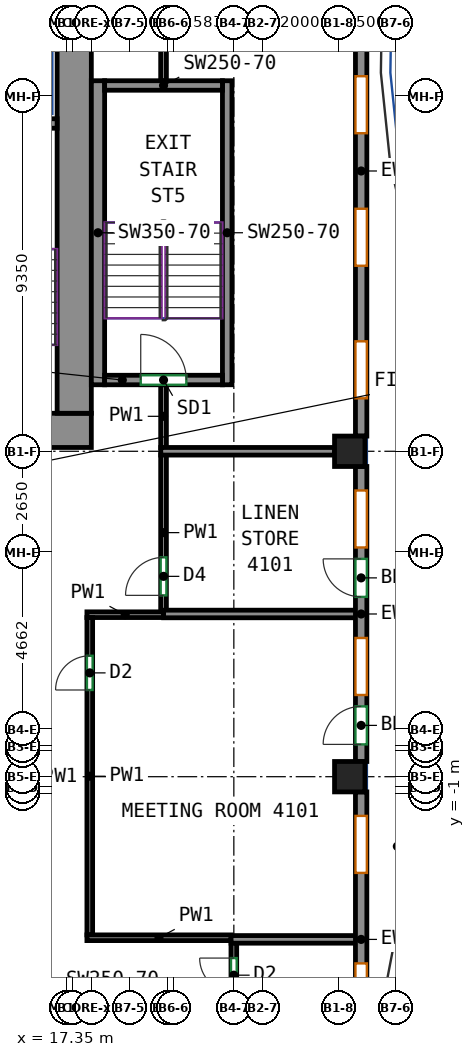
"""IFC4 building model, lengths in metres.
Left out: names, types, materials, properties, quantities, classifications, styles, units other than length and angle.
Written with IfcOpenShell. Run it as: python <this file> out.ifc"""

import sys

from ifc_helpers import new_model, si_unit, direction, frame, frame_2d, origin, origin_2d, place, context, subcontext, project, spatial, rectangle, extrude, source, transform, mapped, element, fill, save


model = new_model("IFC4")
c1 = context("Model", 3, precision=1e-05, world=origin(), true_north=direction((0.0, 1.0)))
c2 = subcontext(c1, "Body", "Model", "MODEL_VIEW")
j1 = project(units=[si_unit("LENGTHUNIT", "METRE"), si_unit("PLANEANGLEUNIT", "RADIAN")], contexts=[c1])
p1 = place(None, origin())
s1 = spatial("IfcSite", under=j1, at=p1, CompositionType="ELEMENT")
p2 = place(p1, origin())
s2 = spatial("IfcBuilding", under=s1, at=p2, CompositionType="ELEMENT")
p3 = place(p2, frame((0.0, 0.0, 175.3)))
s3 = spatial("IfcBuildingStorey", under=s2, at=p3, CompositionType="ELEMENT", Elevation=175.3)
m1 = source(origin(), c2, "Body", "SweptSolid", [
    extrude(rectangle(XDim=0.8, YDim=0.8, at=origin_2d()), origin(), (0.0, 0.0, 1.0), 3.12),
])
for number, where, z_axis, x_axis in (
    (1, (24.8, -0.562, 0.0), (0.0, 0.0, 1.0), (1.0, 0.0, 0.0)),
    (2, (24.8, 8.0, 0.0), (0.0, 0.0, 1.0), (1.0, 0.0, 0.0)),
):
    element("IfcColumn", number, at=place(p3, frame(where, z_axis=z_axis, x_axis=x_axis)), inside=s3, PredefinedType="COLUMN", context=c2, shape_type="MappedRepresentation", body=[
        mapped(m1, transform((0.0, 0.0, 0.0))),
    ])
m2 = source(origin(), c2, "Body", "SweptSolid", [
    extrude(rectangle(XDim=5.53, YDim=0.9, at=frame_2d((2.765, 0.0))), origin(), (0.0, 0.0, 1.0), 3.12),
])
p4 = place(p3, frame((12.47, 8.55, 0.0), z_axis=(0.0, 0.0, 1.0), x_axis=(1.0, 0.0, 0.0)))
e3 = element("IfcWall", 3, at=p4, inside=s3, PredefinedType="SHEAR", context=c2, shape_type="MappedRepresentation", body=[
    mapped(m2, transform((0.0, 0.0, 0.0))),
])
p5 = place(p4, frame((2.18, 0.0, 0.0)))
e4 = element("IfcOpeningElement", 4, at=p5, cuts=e3, PredefinedType="OPENING", context=c2, shape_type="SweptSolid", body=[
    extrude(rectangle(XDim=1.2, YDim=2.1, at=frame_2d((0.6, 1.05))), frame((0.0, 0.46, 0.0), z_axis=(0.0, -1.0, 0.0), x_axis=(1.0, 0.0, 0.0)), (0.0, 0.0, 1.0), 0.92),
])
m3 = source(origin(), c2, "Body", "SweptSolid", [
    extrude(rectangle(XDim=12.0, YDim=0.9, at=frame_2d((6.0, 0.0))), origin(), (0.0, 0.0, 1.0), 3.12),
])
p6 = place(p3, frame((17.55, 9.0, 0.0), z_axis=(0.0, 0.0, 1.0), x_axis=(0.0, 1.0, 0.0)))
e5 = element("IfcWall", 5, at=p6, inside=s3, PredefinedType="SHEAR", context=c2, shape_type="MappedRepresentation", body=[
    mapped(m3, transform((0.0, 0.0, 0.0))),
])
m4 = source(origin(), c2, "Body", "SweptSolid", [
    extrude(rectangle(XDim=3.7, YDim=0.25, at=frame_2d((1.85, 0.0))), origin(), (0.0, 0.0, 1.0), 3.12),
])
p7 = place(p3, frame((13.4, 16.625, 0.0), z_axis=(0.0, 0.0, 1.0), x_axis=(1.0, 0.0, 0.0)))
e6 = element("IfcWall", 6, at=p7, inside=s3, PredefinedType="SHEAR", context=c2, shape_type="MappedRepresentation", body=[
    mapped(m4, transform((0.0, 0.0, 0.0))),
])
m5 = source(origin(), c2, "Body", "SweptSolid", [
    extrude(rectangle(XDim=8.0, YDim=0.35, at=frame_2d((4.0, 0.0))), origin(), (0.0, 0.0, 1.0), 3.12),
])
p8 = place(p3, frame((18.175, 9.75, 0.0), z_axis=(0.0, 0.0, 1.0), x_axis=(0.0, 1.0, 0.0)))
e7 = element("IfcWall", 7, at=p8, inside=s3, PredefinedType="SHEAR", context=c2, shape_type="MappedRepresentation", body=[
    mapped(m5, transform((0.0, 0.0, 0.0))),
])
m6 = source(origin(), c2, "Body", "SweptSolid", [
    extrude(rectangle(XDim=8.0, YDim=0.25, at=frame_2d((4.0, 0.0))), origin(), (0.0, 0.0, 1.0), 3.12),
])
p9 = place(p3, frame((21.575, 9.75, 0.0), z_axis=(0.0, 0.0, 1.0), x_axis=(0.0, 1.0, 0.0)))
e8 = element("IfcWall", 8, at=p9, inside=s3, PredefinedType="SHEAR", context=c2, shape_type="MappedRepresentation", body=[
    mapped(m6, transform((0.0, 0.0, 0.0))),
])
m7 = source(origin(), c2, "Body", "SweptSolid", [
    extrude(rectangle(XDim=3.1, YDim=0.25, at=frame_2d((1.55, 0.0))), origin(), (0.0, 0.0, 1.0), 3.12),
])
p10 = place(p3, frame((18.35, 9.875, 0.0), z_axis=(0.0, 0.0, 1.0), x_axis=(1.0, 0.0, 0.0)))
e9 = element("IfcWall", 9, at=p10, inside=s3, PredefinedType="SHEAR", context=c2, shape_type="MappedRepresentation", body=[
    mapped(m7, transform((0.0, 0.0, 0.0))),
])
p11 = place(p10, frame((0.95, 0.0, 0.0)))
e10 = element("IfcOpeningElement", 10, at=p11, cuts=e9, PredefinedType="OPENING", context=c2, shape_type="SweptSolid", body=[
    extrude(rectangle(XDim=1.2, YDim=2.1, at=frame_2d((0.6, 1.05))), frame((0.0, 0.135, 0.0), z_axis=(0.0, -1.0, 0.0), x_axis=(1.0, 0.0, 0.0)), (0.0, 0.0, 1.0), 0.27),
])
p12 = place(p3, frame((18.35, 17.625, 0.0), z_axis=(0.0, 0.0, 1.0), x_axis=(1.0, 0.0, 0.0)))
e11 = element("IfcWall", 11, at=p12, inside=s3, PredefinedType="SHEAR", context=c2, shape_type="MappedRepresentation", body=[
    mapped(m7, transform((0.0, 0.0, 0.0))),
])
m8 = source(origin(), c2, "Body", "SweptSolid", [
    extrude(rectangle(XDim=7.763, YDim=0.3, at=frame_2d((3.881, 0.0))), origin(), (0.0, 0.0, 1.0), 3.12),
])
p13 = place(p3, frame((25.1, -8.725, 0.0), z_axis=(0.0, 0.0, 1.0), x_axis=(0.0, 1.0, 0.0)))
e12 = element("IfcWall", 12, at=p13, inside=s3, PredefinedType="SOLIDWALL", context=c2, shape_type="MappedRepresentation", body=[
    mapped(m8, transform((0.0, 0.0, 0.0))),
])
p14 = place(p13, frame((1.75, 0.0, 0.85)))
e13 = element("IfcOpeningElement", 13, at=p14, cuts=e12, PredefinedType="OPENING", context=c2, shape_type="SweptSolid", body=[
    extrude(rectangle(XDim=1.5, YDim=1.95, at=frame_2d((0.75, 0.975))), frame((0.0, 0.16, 0.0), z_axis=(0.0, -1.0, 0.0), x_axis=(1.0, 0.0, 0.0)), (0.0, 0.0, 1.0), 0.32),
])
p15 = place(p13, frame((5.631, 0.0, 0.85)))
e14 = element("IfcOpeningElement", 14, at=p15, cuts=e12, PredefinedType="OPENING", context=c2, shape_type="SweptSolid", body=[
    extrude(rectangle(XDim=1.5, YDim=1.95, at=frame_2d((0.75, 0.975))), frame((0.0, 0.16, 0.0), z_axis=(0.0, -1.0, 0.0), x_axis=(1.0, 0.0, 0.0)), (0.0, 0.0, 1.0), 0.32),
])
p16 = place(p3, frame((25.1, -0.163, 0.0), z_axis=(0.0, 0.0, 1.0), x_axis=(0.0, 1.0, 0.0)))
e15 = element("IfcWall", 15, at=p16, inside=s3, PredefinedType="SOLIDWALL", context=c2, shape_type="MappedRepresentation", body=[
    mapped(m8, transform((0.0, 0.0, 0.0))),
])
p17 = place(p16, frame((1.75, 0.0, 0.85)))
e16 = element("IfcOpeningElement", 16, at=p17, cuts=e15, PredefinedType="OPENING", context=c2, shape_type="SweptSolid", body=[
    extrude(rectangle(XDim=1.5, YDim=1.95, at=frame_2d((0.75, 0.975))), frame((0.0, 0.16, 0.0), z_axis=(0.0, -1.0, 0.0), x_axis=(1.0, 0.0, 0.0)), (0.0, 0.0, 1.0), 0.32),
])
p18 = place(p16, frame((0.45, 0.0, 0.0)))
e17 = element("IfcOpeningElement", 17, at=p18, cuts=e15, PredefinedType="OPENING", context=c2, shape_type="SweptSolid", body=[
    extrude(rectangle(XDim=1.0, YDim=2.1, at=frame_2d((0.5, 1.05))), frame((0.0, 0.16, 0.0), z_axis=(0.0, -1.0, 0.0), x_axis=(1.0, 0.0, 0.0)), (0.0, 0.0, 1.0), 0.32),
])
p19 = place(p16, frame((5.631, 0.0, 0.85)))
e18 = element("IfcOpeningElement", 18, at=p19, cuts=e15, PredefinedType="OPENING", context=c2, shape_type="SweptSolid", body=[
    extrude(rectangle(XDim=1.5, YDim=1.95, at=frame_2d((0.75, 0.975))), frame((0.0, 0.16, 0.0), z_axis=(0.0, -1.0, 0.0), x_axis=(1.0, 0.0, 0.0)), (0.0, 0.0, 1.0), 0.32),
])
p20 = place(p16, frame((4.331, 0.0, 0.0)))
e19 = element("IfcOpeningElement", 19, at=p20, cuts=e15, PredefinedType="OPENING", context=c2, shape_type="SweptSolid", body=[
    extrude(rectangle(XDim=1.0, YDim=2.1, at=frame_2d((0.5, 1.05))), frame((0.0, 0.16, 0.0), z_axis=(0.0, -1.0, 0.0), x_axis=(1.0, 0.0, 0.0)), (0.0, 0.0, 1.0), 0.32),
])
m9 = source(origin(), c2, "Body", "SweptSolid", [
    extrude(rectangle(XDim=13.95, YDim=0.3, at=frame_2d((6.975, 0.0))), origin(), (0.0, 0.0, 1.0), 3.12),
])
p21 = place(p3, frame((25.1, 8.4, 0.0), z_axis=(0.0, 0.0, 1.0), x_axis=(0.0, 1.0, 0.0)))
e20 = element("IfcWall", 20, at=p21, inside=s3, PredefinedType="SOLIDWALL", context=c2, shape_type="MappedRepresentation", body=[
    mapped(m9, transform((0.0, 0.0, 0.0))),
])
p22 = place(p21, frame((0.994, 0.0, 0.85)))
e21 = element("IfcOpeningElement", 21, at=p22, cuts=e20, PredefinedType="OPENING", context=c2, shape_type="SweptSolid", body=[
    extrude(rectangle(XDim=1.5, YDim=1.95, at=frame_2d((0.75, 0.975))), frame((0.0, 0.16, 0.0), z_axis=(0.0, -1.0, 0.0), x_axis=(1.0, 0.0, 0.0)), (0.0, 0.0, 1.0), 0.32),
])
p23 = place(p21, frame((4.481, 0.0, 0.85)))
e22 = element("IfcOpeningElement", 22, at=p23, cuts=e20, PredefinedType="OPENING", context=c2, shape_type="SweptSolid", body=[
    extrude(rectangle(XDim=1.5, YDim=1.95, at=frame_2d((0.75, 0.975))), frame((0.0, 0.16, 0.0), z_axis=(0.0, -1.0, 0.0), x_axis=(1.0, 0.0, 0.0)), (0.0, 0.0, 1.0), 0.32),
])
p24 = place(p21, frame((7.969, 0.0, 0.85)))
e23 = element("IfcOpeningElement", 23, at=p24, cuts=e20, PredefinedType="OPENING", context=c2, shape_type="SweptSolid", body=[
    extrude(rectangle(XDim=1.5, YDim=1.95, at=frame_2d((0.75, 0.975))), frame((0.0, 0.16, 0.0), z_axis=(0.0, -1.0, 0.0), x_axis=(1.0, 0.0, 0.0)), (0.0, 0.0, 1.0), 0.32),
])
p25 = place(p21, frame((11.456, 0.0, 0.85)))
e24 = element("IfcOpeningElement", 24, at=p25, cuts=e20, PredefinedType="OPENING", context=c2, shape_type="SweptSolid", body=[
    extrude(rectangle(XDim=1.5, YDim=1.95, at=frame_2d((0.75, 0.975))), frame((0.0, 0.16, 0.0), z_axis=(0.0, -1.0, 0.0), x_axis=(1.0, 0.0, 0.0)), (0.0, 0.0, 1.0), 0.32),
])
p26 = place(p3, frame((19.9, 3.809, 0.0), z_axis=(0.0, 0.0, 1.0), x_axis=(0.0, 1.0, 0.0)))
e25 = element("IfcWall", 25, at=p26, inside=s3, PredefinedType="PARTITIONING", context=c2, shape_type="SweptSolid", body=[
    extrude(rectangle(XDim=4.101, YDim=0.15, at=frame_2d((2.05, 0.0))), origin(), (0.0, 0.0, 1.0), 3.12),
])
p27 = place(p26, frame((0.4, 0.0, 0.0)))
e26 = element("IfcOpeningElement", 26, at=p27, cuts=e25, PredefinedType="OPENING", context=c2, shape_type="SweptSolid", body=[
    extrude(rectangle(XDim=1.0, YDim=2.1, at=frame_2d((0.5, 1.05))), frame((0.0, 0.085, 0.0), z_axis=(0.0, -1.0, 0.0), x_axis=(1.0, 0.0, 0.0)), (0.0, 0.0, 1.0), 0.17),
])
p28 = place(p3, frame((19.9, 17.75, 0.0), z_axis=(0.0, 0.0, 1.0), x_axis=(0.0, 1.0, 0.0)))
e27 = element("IfcWall", 27, at=p28, inside=s3, PredefinedType="PARTITIONING", context=c2, shape_type="SweptSolid", body=[
    extrude(rectangle(XDim=4.175, YDim=0.15, at=frame_2d((2.087, 0.0))), origin(), (0.0, 0.0, 1.0), 3.12),
])
p29 = place(p28, frame((1.432, 0.0, 0.0)))
e28 = element("IfcOpeningElement", 28, at=p29, cuts=e27, PredefinedType="OPENING", context=c2, shape_type="SweptSolid", body=[
    extrude(rectangle(XDim=0.9, YDim=2.1, at=frame_2d((0.45, 1.05))), frame((0.0, 0.085, 0.0), z_axis=(0.0, -1.0, 0.0), x_axis=(1.0, 0.0, 0.0)), (0.0, 0.0, 1.0), 0.17),
])
p30 = place(p3, frame((19.9, 8.09, 0.0), z_axis=(0.0, 0.0, 1.0), x_axis=(0.0, 1.0, 0.0)))
e29 = element("IfcWall", 29, at=p30, inside=s3, PredefinedType="PARTITIONING", context=c2, shape_type="SweptSolid", body=[
    extrude(rectangle(XDim=1.66, YDim=0.15, at=frame_2d((0.83, 0.0))), origin(), (0.0, 0.0, 1.0), 3.12),
])
p31 = place(p3, frame((17.884, 3.7, 0.0), z_axis=(0.0, 0.0, 1.0), x_axis=(1.0, 0.0, 0.0)))
e30 = element("IfcWall", 30, at=p31, inside=s3, PredefinedType="PARTITIONING", context=c2, shape_type="SweptSolid", body=[
    extrude(rectangle(XDim=2.016, YDim=0.15, at=frame_2d((1.008, 0.0))), origin(), (0.0, 0.0, 1.0), 3.12),
])
p32 = place(p3, frame((17.959, -4.725, 0.0), z_axis=(0.0, 0.0, 1.0), x_axis=(0.0, 1.0, 0.0)))
e31 = element("IfcWall", 31, at=p32, inside=s3, PredefinedType="PARTITIONING", context=c2, shape_type="SweptSolid", body=[
    extrude(rectangle(XDim=8.35, YDim=0.15, at=frame_2d((4.175, 0.0))), origin(), (0.0, 0.0, 1.0), 3.12),
])
p33 = place(p32, frame((6.444, 0.0, 0.0)))
e32 = element("IfcOpeningElement", 32, at=p33, cuts=e31, PredefinedType="OPENING", context=c2, shape_type="SweptSolid", body=[
    extrude(rectangle(XDim=0.9, YDim=2.1, at=frame_2d((0.45, 1.05))), frame((0.0, 0.085, 0.0), z_axis=(0.0, -1.0, 0.0), x_axis=(1.0, 0.0, 0.0)), (0.0, 0.0, 1.0), 0.17),
])
p34 = place(p3, frame((17.884, -4.8, 0.0), z_axis=(0.0, 0.0, 1.0), x_axis=(1.0, 0.0, 0.0)))
e33 = element("IfcWall", 33, at=p34, inside=s3, PredefinedType="PARTITIONING", context=c2, shape_type="SweptSolid", body=[
    extrude(rectangle(XDim=3.793, YDim=0.15, at=frame_2d((1.896, 0.0))), origin(), (0.0, 0.0, 1.0), 3.12),
])
p35 = place(p3, frame((21.75, -7.75, 0.0), z_axis=(0.0, 0.0, 1.0), x_axis=(0.0, 1.0, 0.0)))
e34 = element("IfcWall", 34, at=p35, inside=s3, PredefinedType="PARTITIONING", context=c2, shape_type="SweptSolid", body=[
    extrude(rectangle(XDim=2.817, YDim=0.15, at=frame_2d((1.408, 0.0))), origin(), (0.0, 0.0, 1.0), 3.12),
])
p36 = place(p35, frame((1.515, 0.0, 0.0)))
e35 = element("IfcOpeningElement", 35, at=p36, cuts=e34, PredefinedType="OPENING", context=c2, shape_type="SweptSolid", body=[
    extrude(rectangle(XDim=0.9, YDim=2.1, at=frame_2d((0.45, 1.05))), frame((0.0, 0.085, 0.0), z_axis=(0.0, -1.0, 0.0), x_axis=(1.0, 0.0, 0.0)), (0.0, 0.0, 1.0), 0.17),
])
p37 = place(p3, frame((19.827, 8.0, 0.0), z_axis=(0.0, 0.0, 1.0), x_axis=(1.0, 0.0, 0.0)))
e36 = element("IfcWall", 36, at=p37, inside=s3, PredefinedType="PARTITIONING", context=c2, shape_type="SweptSolid", body=[
    extrude(rectangle(XDim=4.573, YDim=0.2, at=frame_2d((2.287, 0.0))), origin(), (0.0, 0.0, 1.0), 3.12),
])
p38 = place(p3, frame((19.902, 3.719, 0.0), z_axis=(0.0, 0.0, 1.0), x_axis=(1.0, 0.0, 0.0)))
e37 = element("IfcWall", 37, at=p38, inside=s3, PredefinedType="PARTITIONING", context=c2, shape_type="SweptSolid", body=[
    extrude(rectangle(XDim=5.098, YDim=0.2, at=frame_2d((2.549, 0.0))), origin(), (0.0, 0.0, 1.0), 3.12),
])
p39 = place(p3, frame((21.677, -4.843, 0.0), z_axis=(0.0, 0.0, 1.0), x_axis=(1.0, 0.0, 0.0)))
e38 = element("IfcWall", 38, at=p39, inside=s3, PredefinedType="PARTITIONING", context=c2, shape_type="SweptSolid", body=[
    extrude(rectangle(XDim=3.323, YDim=0.2, at=frame_2d((1.662, 0.0))), origin(), (0.0, 0.0, 1.0), 3.12),
])
p40 = place(p14, origin())
e39 = element("IfcWindow", 39, at=p40, inside=s3, PartitioningType="SINGLE_PANEL", PredefinedType="WINDOW", context=c2, shape_type="SweptSolid", body=[
    extrude(rectangle(XDim=1.5, YDim=1.95, at=frame_2d((0.75, 0.975))), frame((0.0, 0.03, 0.0), z_axis=(0.0, -1.0, 0.0), x_axis=(1.0, 0.0, 0.0)), (0.0, 0.0, 1.0), 0.06),
])
fill(e13, e39)
p41 = place(p15, origin())
e40 = element("IfcWindow", 40, at=p41, inside=s3, PartitioningType="SINGLE_PANEL", PredefinedType="WINDOW", context=c2, shape_type="SweptSolid", body=[
    extrude(rectangle(XDim=1.5, YDim=1.95, at=frame_2d((0.75, 0.975))), frame((0.0, 0.03, 0.0), z_axis=(0.0, -1.0, 0.0), x_axis=(1.0, 0.0, 0.0)), (0.0, 0.0, 1.0), 0.06),
])
fill(e14, e40)
p42 = place(p17, origin())
e41 = element("IfcWindow", 41, at=p42, inside=s3, PartitioningType="SINGLE_PANEL", PredefinedType="WINDOW", context=c2, shape_type="SweptSolid", body=[
    extrude(rectangle(XDim=1.5, YDim=1.95, at=frame_2d((0.75, 0.975))), frame((0.0, 0.03, 0.0), z_axis=(0.0, -1.0, 0.0), x_axis=(1.0, 0.0, 0.0)), (0.0, 0.0, 1.0), 0.06),
])
fill(e16, e41)
p43 = place(p18, origin())
e42 = element("IfcDoor", 42, at=p43, inside=s3, OperationType="SINGLE_SWING_LEFT", PredefinedType="DOOR", context=c2, shape_type="SweptSolid", body=[
    extrude(rectangle(XDim=1.0, YDim=2.1, at=frame_2d((0.5, 1.05))), frame((0.0, 0.025, 0.0), z_axis=(0.0, -1.0, 0.0), x_axis=(1.0, 0.0, 0.0)), (0.0, 0.0, 1.0), 0.05),
])
fill(e17, e42)
p44 = place(p19, origin())
e43 = element("IfcWindow", 43, at=p44, inside=s3, PartitioningType="SINGLE_PANEL", PredefinedType="WINDOW", context=c2, shape_type="SweptSolid", body=[
    extrude(rectangle(XDim=1.5, YDim=1.95, at=frame_2d((0.75, 0.975))), frame((0.0, 0.03, 0.0), z_axis=(0.0, -1.0, 0.0), x_axis=(1.0, 0.0, 0.0)), (0.0, 0.0, 1.0), 0.06),
])
fill(e18, e43)
p45 = place(p20, origin())
e44 = element("IfcDoor", 44, at=p45, inside=s3, OperationType="SINGLE_SWING_RIGHT", PredefinedType="DOOR", context=c2, shape_type="SweptSolid", body=[
    extrude(rectangle(XDim=1.0, YDim=2.1, at=frame_2d((0.5, 1.05))), frame((0.0, 0.025, 0.0), z_axis=(0.0, -1.0, 0.0), x_axis=(1.0, 0.0, 0.0)), (0.0, 0.0, 1.0), 0.05),
])
fill(e19, e44)
p46 = place(p22, origin())
e45 = element("IfcWindow", 45, at=p46, inside=s3, PartitioningType="SINGLE_PANEL", PredefinedType="WINDOW", context=c2, shape_type="SweptSolid", body=[
    extrude(rectangle(XDim=1.5, YDim=1.95, at=frame_2d((0.75, 0.975))), frame((0.0, 0.03, 0.0), z_axis=(0.0, -1.0, 0.0), x_axis=(1.0, 0.0, 0.0)), (0.0, 0.0, 1.0), 0.06),
])
fill(e21, e45)
p47 = place(p23, origin())
e46 = element("IfcWindow", 46, at=p47, inside=s3, PartitioningType="SINGLE_PANEL", PredefinedType="WINDOW", context=c2, shape_type="SweptSolid", body=[
    extrude(rectangle(XDim=1.5, YDim=1.95, at=frame_2d((0.75, 0.975))), frame((0.0, 0.03, 0.0), z_axis=(0.0, -1.0, 0.0), x_axis=(1.0, 0.0, 0.0)), (0.0, 0.0, 1.0), 0.06),
])
fill(e22, e46)
p48 = place(p24, origin())
e47 = element("IfcWindow", 47, at=p48, inside=s3, PartitioningType="SINGLE_PANEL", PredefinedType="WINDOW", context=c2, shape_type="SweptSolid", body=[
    extrude(rectangle(XDim=1.5, YDim=1.95, at=frame_2d((0.75, 0.975))), frame((0.0, 0.03, 0.0), z_axis=(0.0, -1.0, 0.0), x_axis=(1.0, 0.0, 0.0)), (0.0, 0.0, 1.0), 0.06),
])
fill(e23, e47)
p49 = place(p11, origin())
e48 = element("IfcDoor", 48, at=p49, inside=s3, OperationType="DOUBLE_DOOR_SINGLE_SWING", PredefinedType="DOOR", context=c2, shape_type="SweptSolid", body=[
    extrude(rectangle(XDim=1.2, YDim=2.1, at=frame_2d((0.6, 1.05))), frame((0.0, 0.025, 0.0), z_axis=(0.0, -1.0, 0.0), x_axis=(1.0, 0.0, 0.0)), (0.0, 0.0, 1.0), 0.05),
])
fill(e10, e48)
p50 = place(p36, origin())
e49 = element("IfcDoor", 49, at=p50, inside=s3, OperationType="SINGLE_SWING_RIGHT", PredefinedType="DOOR", context=c2, shape_type="SweptSolid", body=[
    extrude(rectangle(XDim=0.9, YDim=2.1, at=frame_2d((0.45, 1.05))), frame((0.0, 0.025, 0.0), z_axis=(0.0, -1.0, 0.0), x_axis=(1.0, 0.0, 0.0)), (0.0, 0.0, 1.0), 0.05),
])
fill(e35, e49)
p51 = place(p33, origin())
e50 = element("IfcDoor", 50, at=p51, inside=s3, OperationType="SINGLE_SWING_LEFT", PredefinedType="DOOR", context=c2, shape_type="SweptSolid", body=[
    extrude(rectangle(XDim=0.9, YDim=2.1, at=frame_2d((0.45, 1.05))), frame((0.0, 0.025, 0.0), z_axis=(0.0, -1.0, 0.0), x_axis=(1.0, 0.0, 0.0)), (0.0, 0.0, 1.0), 0.05),
])
fill(e32, e50)
p52 = place(p27, origin())
e51 = element("IfcDoor", 51, at=p52, inside=s3, OperationType="SINGLE_SWING_LEFT", PredefinedType="DOOR", context=c2, shape_type="SweptSolid", body=[
    extrude(rectangle(XDim=1.0, YDim=2.1, at=frame_2d((0.5, 1.05))), frame((0.0, 0.025, 0.0), z_axis=(0.0, -1.0, 0.0), x_axis=(1.0, 0.0, 0.0)), (0.0, 0.0, 1.0), 0.05),
])
fill(e26, e51)
save(model, sys.argv[1])
